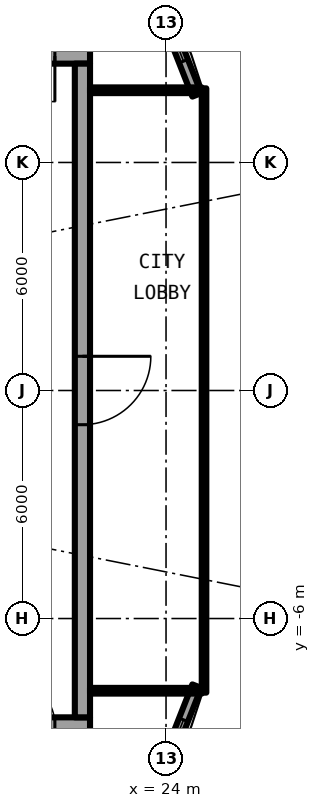
"""IFC4 building model, lengths in metres.
Left out: names, types, materials, properties, quantities, classifications, styles, units other than length and angle.
Written with IfcOpenShell. Run it as: python <this file> out.ifc"""

import sys

from ifc_helpers import new_model, si_unit, direction, frame, frame_2d, origin, place, context, subcontext, project, spatial, rectangle, extrude, element, fill, save


model = new_model("IFC4")
c1 = context("Model", 3, precision=1e-05, world=origin(), true_north=direction((0.0, 1.0)))
c2 = subcontext(c1, "Body", "Model", "MODEL_VIEW")
j1 = project(units=[si_unit("LENGTHUNIT", "METRE"), si_unit("PLANEANGLEUNIT", "RADIAN")], contexts=[c1])
p1 = place(None, origin())
s1 = spatial("IfcSite", under=j1, at=p1, CompositionType="ELEMENT")
p2 = place(p1, origin())
s2 = spatial("IfcBuilding", under=s1, at=p2, CompositionType="ELEMENT")
p3 = place(p2, frame((0.0, 0.0, 243.2)))
s3 = spatial("IfcBuildingStorey", under=s2, at=p3, CompositionType="ELEMENT", Elevation=243.2)
p4 = place(p3, frame((24.809, 7.779, 0.0), z_axis=(0.0, 0.0, 1.0), x_axis=(-0.366351636034, 0.930476479432, 0.0)))
e1 = element("IfcWall", 1, at=p4, inside=s3, PredefinedType="SOLIDWALL", context=c2, shape_type="SweptSolid", body=[
    extrude(rectangle(XDim=3.705, YDim=0.25, at=frame_2d((1.852, 0.0))), origin(), (0.0, 0.0, 1.0), 2.7),
])
p5 = place(p4, frame((0.952, 0.0, 0.3)))
e2 = element("IfcOpeningElement", 2, at=p5, cuts=e1, PredefinedType="OPENING", context=c2, shape_type="SweptSolid", body=[
    extrude(rectangle(XDim=1.8, YDim=2.1, at=frame_2d((0.9, 1.05))), frame((0.0, 0.135, 0.0), z_axis=(0.0, -1.0, 0.0), x_axis=(1.0, 0.0, 0.0)), (0.0, 0.0, 1.0), 0.27),
])
p6 = place(p3, frame((23.452, -11.226, 0.0), z_axis=(0.0, 0.0, 1.0), x_axis=(0.366351636034, 0.930476479432, 0.0)))
e3 = element("IfcWall", 3, at=p6, inside=s3, PredefinedType="SOLIDWALL", context=c2, shape_type="SweptSolid", body=[
    extrude(rectangle(XDim=3.705, YDim=0.25, at=frame_2d((1.852, 0.0))), origin(), (0.0, 0.0, 1.0), 2.7),
])
p7 = place(p6, frame((0.952, 0.0, 0.3)))
e4 = element("IfcOpeningElement", 4, at=p7, cuts=e3, PredefinedType="OPENING", context=c2, shape_type="SweptSolid", body=[
    extrude(rectangle(XDim=1.8, YDim=2.1, at=frame_2d((0.9, 1.05))), frame((0.0, 0.135, 0.0), z_axis=(0.0, -1.0, 0.0), x_axis=(1.0, 0.0, 0.0)), (0.0, 0.0, 1.0), 0.27),
])
p8 = place(p3, frame((22.0, 8.8, 0.0), z_axis=(0.0, 0.0, 1.0), x_axis=(-1.0, 0.0, 0.0)))
e5 = element("IfcWall", 5, at=p8, inside=s3, PredefinedType="SHEAR", context=c2, shape_type="SweptSolid", body=[
    extrude(rectangle(XDim=13.4, YDim=0.4, at=frame_2d((6.7, 0.0))), origin(), (0.0, 0.0, 1.0), 3.05),
])
p9 = place(p8, frame((0.925, 0.0, 0.0)))
e6 = element("IfcOpeningElement", 6, at=p9, cuts=e5, PredefinedType="OPENING", context=c2, shape_type="SweptSolid", body=[
    extrude(rectangle(XDim=1.2, YDim=2.3, at=frame_2d((0.6, 1.15))), frame((0.0, 0.21, 0.0), z_axis=(0.0, -1.0, 0.0), x_axis=(1.0, 0.0, 0.0)), (0.0, 0.0, 1.0), 0.42),
])
p10 = place(p3, frame((8.6, -8.8, 0.0), z_axis=(0.0, 0.0, 1.0), x_axis=(1.0, 0.0, 0.0)))
e7 = element("IfcWall", 7, at=p10, inside=s3, PredefinedType="SHEAR", context=c2, shape_type="SweptSolid", body=[
    extrude(rectangle(XDim=13.4, YDim=0.4, at=frame_2d((6.7, 0.0))), origin(), (0.0, 0.0, 1.0), 3.05),
])
p11 = place(p10, frame((11.275, 0.0, 0.0)))
e8 = element("IfcOpeningElement", 8, at=p11, cuts=e7, PredefinedType="OPENING", context=c2, shape_type="SweptSolid", body=[
    extrude(rectangle(XDim=1.2, YDim=2.3, at=frame_2d((0.6, 1.15))), frame((0.0, 0.21, 0.0), z_axis=(0.0, -1.0, 0.0), x_axis=(1.0, 0.0, 0.0)), (0.0, 0.0, 1.0), 0.42),
])
p12 = place(p3, frame((21.8, 8.6, 0.0), z_axis=(0.0, 0.0, 1.0), x_axis=(0.0, -1.0, 0.0)))
e9 = element("IfcWall", 9, at=p12, inside=s3, PredefinedType="SHEAR", context=c2, shape_type="SweptSolid", body=[
    extrude(rectangle(XDim=17.2, YDim=0.4, at=frame_2d((8.6, 0.0))), origin(), (0.0, 0.0, 1.0), 3.05),
])
p13 = place(p12, frame((7.7, 0.0, 0.0)))
e10 = element("IfcOpeningElement", 10, at=p13, cuts=e9, PredefinedType="OPENING", context=c2, shape_type="SweptSolid", body=[
    extrude(rectangle(XDim=1.8, YDim=2.3, at=frame_2d((0.9, 1.15))), frame((0.0, 0.21, 0.0), z_axis=(0.0, -1.0, 0.0), x_axis=(1.0, 0.0, 0.0)), (0.0, 0.0, 1.0), 0.42),
])
for number, where, z_axis, x_axis in (
    (11, (22.0, -7.9, 0.0), (0.0, 0.0, 1.0), (1.0, 0.0, 0.0)),
    (12, (22.0, 7.9, 0.0), (0.0, 0.0, 1.0), (1.0, 0.0, 0.0)),
):
    element("IfcWall", number, at=place(p3, frame(where, z_axis=z_axis, x_axis=x_axis)), inside=s3, PredefinedType="PARTITIONING", context=c2, shape_type="SweptSolid", body=[
        extrude(rectangle(XDim=2.94, YDim=0.15, at=frame_2d((1.47, 0.0))), origin(), (0.0, 0.0, 1.0), 2.7),
    ])
p14 = place(p3, frame((25.0, -7.95, 0.0), z_axis=(0.0, 0.0, 1.0), x_axis=(0.0, 1.0, 0.0)))
e13 = element("IfcWall", 13, at=p14, inside=s3, PredefinedType="PARTITIONING", context=c2, shape_type="SweptSolid", body=[
    extrude(rectangle(XDim=15.9, YDim=0.12, at=frame_2d((7.95, 0.0))), origin(), (0.0, 0.0, 1.0), 2.7),
])
p15 = place(p14, frame((0.95, 0.0, 0.1)))
e14 = element("IfcOpeningElement", 14, at=p15, cuts=e13, PredefinedType="OPENING", context=c2, shape_type="SweptSolid", body=[
    extrude(rectangle(XDim=14.0, YDim=2.35, at=frame_2d((7.0, 1.175))), frame((0.0, 0.07, 0.0), z_axis=(0.0, -1.0, 0.0), x_axis=(1.0, 0.0, 0.0)), (0.0, 0.0, 1.0), 0.14),
])
p16 = place(p5, origin())
e15 = element("IfcWindow", 15, at=p16, inside=s3, PartitioningType="SINGLE_PANEL", PredefinedType="WINDOW", context=c2, shape_type="SweptSolid", body=[
    extrude(rectangle(XDim=1.8, YDim=2.1, at=frame_2d((0.9, 1.05))), frame((0.0, 0.03, 0.0), z_axis=(0.0, -1.0, 0.0), x_axis=(1.0, 0.0, 0.0)), (0.0, 0.0, 1.0), 0.06),
])
fill(e2, e15)
p17 = place(p7, origin())
e16 = element("IfcWindow", 16, at=p17, inside=s3, PartitioningType="SINGLE_PANEL", PredefinedType="WINDOW", context=c2, shape_type="SweptSolid", body=[
    extrude(rectangle(XDim=1.8, YDim=2.1, at=frame_2d((0.9, 1.05))), frame((0.0, 0.03, 0.0), z_axis=(0.0, -1.0, 0.0), x_axis=(1.0, 0.0, 0.0)), (0.0, 0.0, 1.0), 0.06),
])
fill(e4, e16)
p18 = place(p9, origin())
e17 = element("IfcDoor", 17, at=p18, inside=s3, OperationType="SINGLE_SWING_RIGHT", PredefinedType="DOOR", context=c2, shape_type="SweptSolid", body=[
    extrude(rectangle(XDim=1.2, YDim=2.3, at=frame_2d((0.6, 1.15))), frame((0.0, 0.025, 0.0), z_axis=(0.0, -1.0, 0.0), x_axis=(1.0, 0.0, 0.0)), (0.0, 0.0, 1.0), 0.05),
])
fill(e6, e17)
p19 = place(p11, origin())
e18 = element("IfcDoor", 18, at=p19, inside=s3, OperationType="SINGLE_SWING_LEFT", PredefinedType="DOOR", context=c2, shape_type="SweptSolid", body=[
    extrude(rectangle(XDim=1.2, YDim=2.3, at=frame_2d((0.6, 1.15))), frame((0.0, 0.025, 0.0), z_axis=(0.0, -1.0, 0.0), x_axis=(1.0, 0.0, 0.0)), (0.0, 0.0, 1.0), 0.05),
])
fill(e8, e18)
p20 = place(p13, origin())
e19 = element("IfcDoor", 19, at=p20, inside=s3, OperationType="SINGLE_SWING_LEFT", PredefinedType="DOOR", context=c2, shape_type="SweptSolid", body=[
    extrude(rectangle(XDim=1.8, YDim=2.3, at=frame_2d((0.9, 1.15))), frame((0.0, 0.025, 0.0), z_axis=(0.0, -1.0, 0.0), x_axis=(1.0, 0.0, 0.0)), (0.0, 0.0, 1.0), 0.05),
])
fill(e10, e19)
p21 = place(p15, origin())
e20 = element("IfcWindow", 20, at=p21, inside=s3, PartitioningType="SINGLE_PANEL", PredefinedType="WINDOW", context=c2, shape_type="SweptSolid", body=[
    extrude(rectangle(XDim=14.0, YDim=2.35, at=frame_2d((7.0, 1.175))), frame((0.0, 0.03, 0.0), z_axis=(0.0, -1.0, 0.0), x_axis=(1.0, 0.0, 0.0)), (0.0, 0.0, 1.0), 0.06),
])
fill(e14, e20)
save(model, sys.argv[1])
